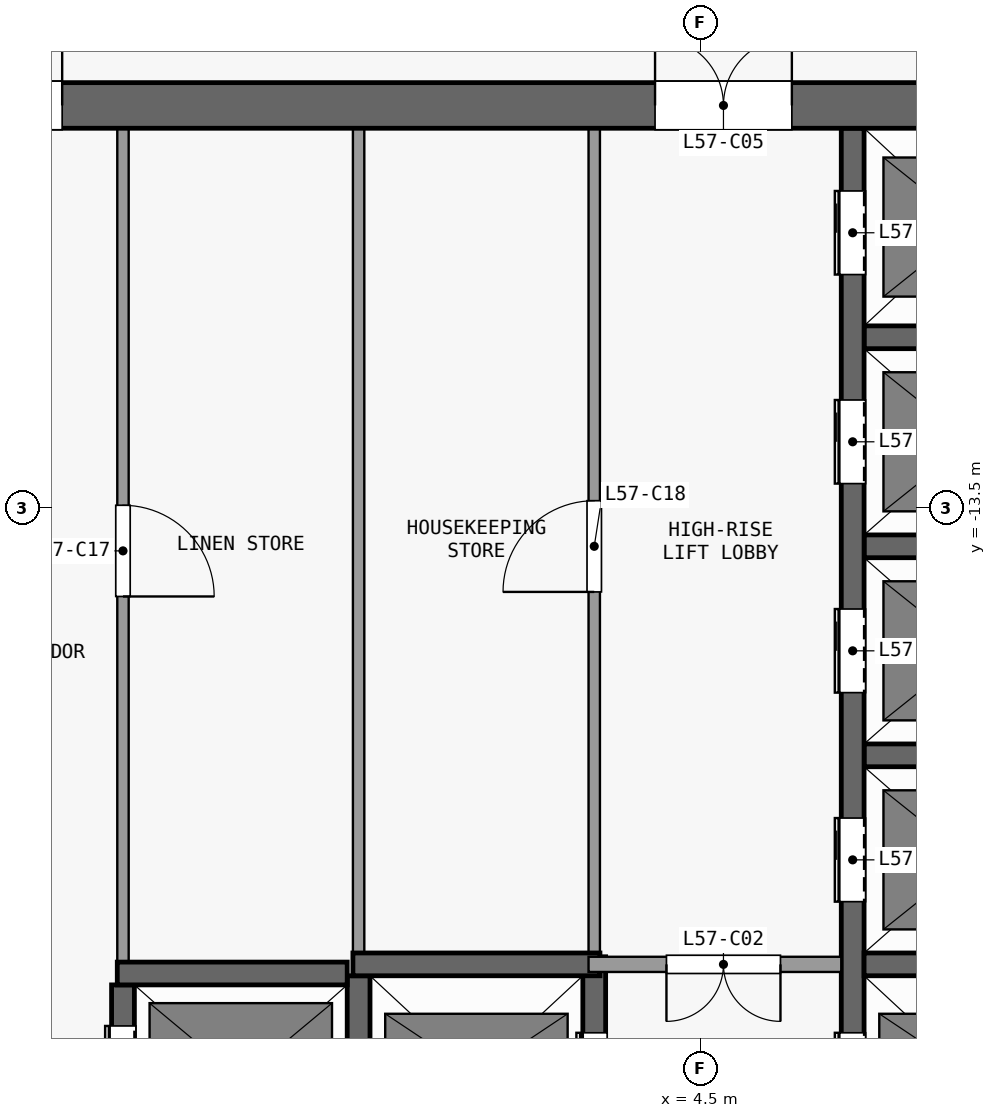
"""IFC4 building model, lengths in metres.
Left out: names, types, materials, properties, quantities, classifications, styles, units other than length and angle.
Written with IfcOpenShell. Run it as: python <this file> out.ifc"""

import sys

from ifc_helpers import new_model, si_unit, direction, frame, frame_2d, origin, place, context, subcontext, project, spatial, rectangle, extrude, element, fill, save


model = new_model("IFC4")
c1 = context("Model", 3, precision=1e-05, world=origin(), true_north=direction((0.0, 1.0)))
c2 = subcontext(c1, "Body", "Model", "MODEL_VIEW")
j1 = project(units=[si_unit("LENGTHUNIT", "METRE"), si_unit("PLANEANGLEUNIT", "RADIAN")], contexts=[c1])
p1 = place(None, origin())
s1 = spatial("IfcSite", under=j1, at=p1, CompositionType="ELEMENT")
p2 = place(p1, origin())
s2 = spatial("IfcBuilding", under=s1, at=p2, CompositionType="ELEMENT")
p3 = place(p2, frame((0.0, 0.0, 226.7)))
s3 = spatial("IfcBuildingStorey", under=s2, at=p3, CompositionType="ELEMENT", Elevation=226.7)
p4 = place(p3, frame((-13.2, -8.2, 0.0), z_axis=(0.0, 0.0, 1.0), x_axis=(1.0, 0.0, 0.0)))
e1 = element("IfcWall", 1, at=p4, inside=s3, PredefinedType="SHEAR", context=c2, shape_type="SweptSolid", body=[
    extrude(rectangle(XDim=26.4, YDim=0.6, at=frame_2d((13.2, 0.0))), origin(), (0.0, 0.0, 1.0), 3.3),
])
p5 = place(p4, frame((7.5, 0.0, 0.0)))
e2 = element("IfcOpeningElement", 2, at=p5, cuts=e1, PredefinedType="OPENING", context=c2, shape_type="SweptSolid", body=[
    extrude(rectangle(XDim=1.8, YDim=2.1, at=frame_2d((0.9, 1.05))), frame((0.0, 0.31, 0.0), z_axis=(0.0, -1.0, 0.0), x_axis=(1.0, 0.0, 0.0)), (0.0, 0.0, 1.0), 0.62),
])
p6 = place(p4, frame((17.1, 0.0, 0.0)))
e3 = element("IfcOpeningElement", 3, at=p6, cuts=e1, PredefinedType="OPENING", context=c2, shape_type="SweptSolid", body=[
    extrude(rectangle(XDim=1.8, YDim=2.1, at=frame_2d((0.9, 1.05))), frame((0.0, 0.31, 0.0), z_axis=(0.0, -1.0, 0.0), x_axis=(1.0, 0.0, 0.0)), (0.0, 0.0, 1.0), 0.62),
])
p7 = place(p4, frame((2.425, 0.0, 0.0)))
e4 = element("IfcOpeningElement", 4, at=p7, cuts=e1, PredefinedType="OPENING", context=c2, shape_type="SweptSolid", body=[
    extrude(rectangle(XDim=0.9, YDim=2.1, at=frame_2d((0.45, 1.05))), frame((0.0, 0.31, 0.0), z_axis=(0.0, -1.0, 0.0), x_axis=(1.0, 0.0, 0.0)), (0.0, 0.0, 1.0), 0.62),
])
p8 = place(p4, frame((23.075, 0.0, 0.0)))
e5 = element("IfcOpeningElement", 5, at=p8, cuts=e1, PredefinedType="OPENING", context=c2, shape_type="SweptSolid", body=[
    extrude(rectangle(XDim=0.9, YDim=2.1, at=frame_2d((0.45, 1.05))), frame((0.0, 0.31, 0.0), z_axis=(0.0, -1.0, 0.0), x_axis=(1.0, 0.0, 0.0)), (0.0, 0.0, 1.0), 0.62),
])
p9 = place(p3, frame((-3.175, -19.62, 0.0), z_axis=(0.0, 0.0, 1.0), x_axis=(1.0, 0.0, 0.0)))
e6 = element("IfcWall", 6, at=p9, inside=s3, PredefinedType="SHEAR", context=c2, shape_type="SweptSolid", body=[
    extrude(rectangle(XDim=3.025, YDim=0.3, at=frame_2d((1.513, 0.0))), origin(), (0.0, 0.0, 1.0), 3.3),
])
p10 = place(p3, frame((-0.075, -19.5, 0.0), z_axis=(0.0, 0.0, 1.0), x_axis=(1.0, 0.0, 0.0)))
e7 = element("IfcWall", 7, at=p10, inside=s3, PredefinedType="SHEAR", context=c2, shape_type="SweptSolid", body=[
    extrude(rectangle(XDim=3.25, YDim=0.3, at=frame_2d((1.625, 0.0))), origin(), (0.0, 0.0, 1.0), 3.3),
])
p11 = place(p3, frame((6.35, -19.5, 0.0), z_axis=(0.0, 0.0, 1.0), x_axis=(-1.0, 0.0, 0.0)))
e8 = element("IfcWall", 8, at=p11, inside=s3, PredefinedType="PARTITIONING", context=c2, shape_type="SweptSolid", body=[
    extrude(rectangle(XDim=3.325, YDim=0.2, at=frame_2d((1.663, 0.0))), origin(), (0.0, 0.0, 1.0), 3.3),
])
p12 = place(p11, frame((0.8, 0.0, 0.0)))
e9 = element("IfcOpeningElement", 9, at=p12, cuts=e8, PredefinedType="OPENING", context=c2, shape_type="SweptSolid", body=[
    extrude(rectangle(XDim=1.5, YDim=2.1, at=frame_2d((0.75, 1.05))), frame((0.0, 0.11, 0.0), z_axis=(0.0, -1.0, 0.0), x_axis=(1.0, 0.0, 0.0)), (0.0, 0.0, 1.0), 0.22),
])
for number, where, z_axis, x_axis in (
    (10, (6.65, -19.5, 0.0), (0.0, 0.0, 1.0), (1.0, 0.0, 0.0)),
    (11, (6.65, -16.75, 0.0), (0.0, 0.0, 1.0), (1.0, 0.0, 0.0)),
    (12, (6.65, -14.0, 0.0), (0.0, 0.0, 1.0), (1.0, 0.0, 0.0)),
    (13, (6.65, -11.25, 0.0), (0.0, 0.0, 1.0), (1.0, 0.0, 0.0)),
):
    element("IfcWall", number, at=place(p3, frame(where, z_axis=z_axis, x_axis=x_axis)), inside=s3, PredefinedType="SHEAR", context=c2, shape_type="SweptSolid", body=[
        extrude(rectangle(XDim=2.8, YDim=0.3, at=frame_2d((1.4, 0.0))), origin(), (0.0, 0.0, 1.0), 3.3),
    ])
p13 = place(p3, frame((-3.1, -22.25, 0.0), z_axis=(0.0, 0.0, 1.0), x_axis=(0.0, 1.0, 0.0)))
e14 = element("IfcWall", 14, at=p13, inside=s3, PredefinedType="SHEAR", context=c2, shape_type="SweptSolid", body=[
    extrude(rectangle(XDim=2.48, YDim=0.3, at=frame_2d((1.24, 0.0))), origin(), (0.0, 0.0, 1.0), 3.3),
])
p14 = place(p13, frame((0.54, 0.0, 0.0)))
e15 = element("IfcOpeningElement", 15, at=p14, cuts=e14, PredefinedType="OPENING", context=c2, shape_type="SweptSolid", body=[
    extrude(rectangle(XDim=1.4, YDim=2.1, at=frame_2d((0.7, 1.05))), frame((0.0, 0.16, 0.0), z_axis=(0.0, -1.0, 0.0), x_axis=(1.0, 0.0, 0.0)), (0.0, 0.0, 1.0), 0.32),
])
p15 = place(p3, frame((-3.1, -8.5, 0.0), z_axis=(0.0, 0.0, 1.0), x_axis=(0.0, -1.0, 0.0)))
e16 = element("IfcWall", 16, at=p15, inside=s3, PredefinedType="PARTITIONING", context=c2, shape_type="SweptSolid", body=[
    extrude(rectangle(XDim=10.97, YDim=0.15, at=frame_2d((5.485, 0.0))), origin(), (0.0, 0.0, 1.0), 3.3),
])
p16 = place(p15, frame((4.96, 0.0, 0.0)))
e17 = element("IfcOpeningElement", 17, at=p16, cuts=e16, PredefinedType="OPENING", context=c2, shape_type="SweptSolid", body=[
    extrude(rectangle(XDim=1.2, YDim=2.1, at=frame_2d((0.6, 1.05))), frame((0.0, 0.085, 0.0), z_axis=(0.0, -1.0, 0.0), x_axis=(1.0, 0.0, 0.0)), (0.0, 0.0, 1.0), 0.17),
])
p17 = place(p3, frame((0.0, -22.25, 0.0), z_axis=(0.0, 0.0, 1.0), x_axis=(0.0, 1.0, 0.0)))
e18 = element("IfcWall", 18, at=p17, inside=s3, PredefinedType="SHEAR", context=c2, shape_type="SweptSolid", body=[
    extrude(rectangle(XDim=2.6, YDim=0.3, at=frame_2d((1.3, 0.0))), origin(), (0.0, 0.0, 1.0), 3.3),
])
p18 = place(p3, frame((0.0, -19.35, 0.0), z_axis=(0.0, 0.0, 1.0), x_axis=(0.0, 1.0, 0.0)))
e19 = element("IfcWall", 19, at=p18, inside=s3, PredefinedType="PARTITIONING", context=c2, shape_type="SweptSolid", body=[
    extrude(rectangle(XDim=10.85, YDim=0.15, at=frame_2d((5.425, 0.0))), origin(), (0.0, 0.0, 1.0), 3.3),
])
p19 = place(p3, frame((3.1, -22.25, 0.0), z_axis=(0.0, 0.0, 1.0), x_axis=(0.0, 1.0, 0.0)))
e20 = element("IfcWall", 20, at=p19, inside=s3, PredefinedType="SHEAR", context=c2, shape_type="SweptSolid", body=[
    extrude(rectangle(XDim=2.85, YDim=0.3, at=frame_2d((1.425, 0.0))), origin(), (0.0, 0.0, 1.0), 3.3),
])
p20 = place(p19, frame((0.75, 0.0, 0.0)))
e21 = element("IfcOpeningElement", 21, at=p20, cuts=e20, PredefinedType="OPENING", context=c2, shape_type="SweptSolid", body=[
    extrude(rectangle(XDim=1.1, YDim=2.1, at=frame_2d((0.55, 1.05))), frame((0.0, 0.16, 0.0), z_axis=(0.0, -1.0, 0.0), x_axis=(1.0, 0.0, 0.0)), (0.0, 0.0, 1.0), 0.32),
])
p21 = place(p3, frame((3.1, -19.4, 0.0), z_axis=(0.0, 0.0, 1.0), x_axis=(0.0, 1.0, 0.0)))
e22 = element("IfcWall", 22, at=p21, inside=s3, PredefinedType="PARTITIONING", context=c2, shape_type="SweptSolid", body=[
    extrude(rectangle(XDim=10.9, YDim=0.15, at=frame_2d((5.45, 0.0))), origin(), (0.0, 0.0, 1.0), 3.3),
])
p22 = place(p21, frame((4.8, 0.0, 0.0)))
e23 = element("IfcOpeningElement", 23, at=p22, cuts=e22, PredefinedType="OPENING", context=c2, shape_type="SweptSolid", body=[
    extrude(rectangle(XDim=1.2, YDim=2.1, at=frame_2d((0.6, 1.05))), frame((0.0, 0.085, 0.0), z_axis=(0.0, -1.0, 0.0), x_axis=(1.0, 0.0, 0.0)), (0.0, 0.0, 1.0), 0.17),
])
p23 = place(p3, frame((6.5, -22.55, 0.0), z_axis=(0.0, 0.0, 1.0), x_axis=(0.0, 1.0, 0.0)))
e24 = element("IfcWall", 24, at=p23, inside=s3, PredefinedType="SHEAR", context=c2, shape_type="SweptSolid", body=[
    extrude(rectangle(XDim=14.05, YDim=0.3, at=frame_2d((7.025, 0.0))), origin(), (0.0, 0.0, 1.0), 3.3),
])
p24 = place(p23, frame((1.05, 0.0, 0.0)))
e25 = element("IfcOpeningElement", 25, at=p24, cuts=e24, PredefinedType="OPENING", context=c2, shape_type="SweptSolid", body=[
    extrude(rectangle(XDim=1.1, YDim=2.1, at=frame_2d((0.55, 1.05))), frame((0.0, 0.16, 0.0), z_axis=(0.0, -1.0, 0.0), x_axis=(1.0, 0.0, 0.0)), (0.0, 0.0, 1.0), 0.32),
])
p25 = place(p23, frame((3.875, 0.0, 0.0)))
e26 = element("IfcOpeningElement", 26, at=p25, cuts=e24, PredefinedType="OPENING", context=c2, shape_type="SweptSolid", body=[
    extrude(rectangle(XDim=1.1, YDim=2.1, at=frame_2d((0.55, 1.05))), frame((0.0, 0.16, 0.0), z_axis=(0.0, -1.0, 0.0), x_axis=(1.0, 0.0, 0.0)), (0.0, 0.0, 1.0), 0.32),
])
p26 = place(p23, frame((6.625, 0.0, 0.0)))
e27 = element("IfcOpeningElement", 27, at=p26, cuts=e24, PredefinedType="OPENING", context=c2, shape_type="SweptSolid", body=[
    extrude(rectangle(XDim=1.1, YDim=2.1, at=frame_2d((0.55, 1.05))), frame((0.0, 0.16, 0.0), z_axis=(0.0, -1.0, 0.0), x_axis=(1.0, 0.0, 0.0)), (0.0, 0.0, 1.0), 0.32),
])
p27 = place(p23, frame((9.375, 0.0, 0.0)))
e28 = element("IfcOpeningElement", 28, at=p27, cuts=e24, PredefinedType="OPENING", context=c2, shape_type="SweptSolid", body=[
    extrude(rectangle(XDim=1.1, YDim=2.1, at=frame_2d((0.55, 1.05))), frame((0.0, 0.16, 0.0), z_axis=(0.0, -1.0, 0.0), x_axis=(1.0, 0.0, 0.0)), (0.0, 0.0, 1.0), 0.32),
])
p28 = place(p23, frame((12.125, 0.0, 0.0)))
e29 = element("IfcOpeningElement", 29, at=p28, cuts=e24, PredefinedType="OPENING", context=c2, shape_type="SweptSolid", body=[
    extrude(rectangle(XDim=1.1, YDim=2.1, at=frame_2d((0.55, 1.05))), frame((0.0, 0.16, 0.0), z_axis=(0.0, -1.0, 0.0), x_axis=(1.0, 0.0, 0.0)), (0.0, 0.0, 1.0), 0.32),
])
p29 = place(p20, origin())
e30 = element("IfcDoor", 30, at=p29, inside=s3, OperationType="DOUBLE_DOOR_SLIDING", PredefinedType="DOOR", context=c2, shape_type="SweptSolid", body=[
    extrude(rectangle(XDim=1.1, YDim=2.1, at=frame_2d((0.55, 1.05))), frame((0.0, 0.025, 0.0), z_axis=(0.0, -1.0, 0.0), x_axis=(1.0, 0.0, 0.0)), (0.0, 0.0, 1.0), 0.05),
])
fill(e21, e30)
p30 = place(p24, origin())
e31 = element("IfcDoor", 31, at=p30, inside=s3, OperationType="DOUBLE_DOOR_SLIDING", PredefinedType="DOOR", context=c2, shape_type="SweptSolid", body=[
    extrude(rectangle(XDim=1.1, YDim=2.1, at=frame_2d((0.55, 1.05))), frame((0.0, 0.025, 0.0), z_axis=(0.0, -1.0, 0.0), x_axis=(1.0, 0.0, 0.0)), (0.0, 0.0, 1.0), 0.05),
])
fill(e25, e31)
p31 = place(p25, origin())
e32 = element("IfcDoor", 32, at=p31, inside=s3, OperationType="DOUBLE_DOOR_SLIDING", PredefinedType="DOOR", context=c2, shape_type="SweptSolid", body=[
    extrude(rectangle(XDim=1.1, YDim=2.1, at=frame_2d((0.55, 1.05))), frame((0.0, 0.025, 0.0), z_axis=(0.0, -1.0, 0.0), x_axis=(1.0, 0.0, 0.0)), (0.0, 0.0, 1.0), 0.05),
])
fill(e26, e32)
p32 = place(p26, origin())
e33 = element("IfcDoor", 33, at=p32, inside=s3, OperationType="DOUBLE_DOOR_SLIDING", PredefinedType="DOOR", context=c2, shape_type="SweptSolid", body=[
    extrude(rectangle(XDim=1.1, YDim=2.1, at=frame_2d((0.55, 1.05))), frame((0.0, 0.025, 0.0), z_axis=(0.0, -1.0, 0.0), x_axis=(1.0, 0.0, 0.0)), (0.0, 0.0, 1.0), 0.05),
])
fill(e27, e33)
p33 = place(p27, origin())
e34 = element("IfcDoor", 34, at=p33, inside=s3, OperationType="DOUBLE_DOOR_SLIDING", PredefinedType="DOOR", context=c2, shape_type="SweptSolid", body=[
    extrude(rectangle(XDim=1.1, YDim=2.1, at=frame_2d((0.55, 1.05))), frame((0.0, 0.025, 0.0), z_axis=(0.0, -1.0, 0.0), x_axis=(1.0, 0.0, 0.0)), (0.0, 0.0, 1.0), 0.05),
])
fill(e28, e34)
p34 = place(p28, origin())
e35 = element("IfcDoor", 35, at=p34, inside=s3, OperationType="DOUBLE_DOOR_SLIDING", PredefinedType="DOOR", context=c2, shape_type="SweptSolid", body=[
    extrude(rectangle(XDim=1.1, YDim=2.1, at=frame_2d((0.55, 1.05))), frame((0.0, 0.025, 0.0), z_axis=(0.0, -1.0, 0.0), x_axis=(1.0, 0.0, 0.0)), (0.0, 0.0, 1.0), 0.05),
])
fill(e29, e35)
p35 = place(p14, origin())
e36 = element("IfcDoor", 36, at=p35, inside=s3, OperationType="DOUBLE_DOOR_SLIDING", PredefinedType="DOOR", context=c2, shape_type="SweptSolid", body=[
    extrude(rectangle(XDim=1.4, YDim=2.1, at=frame_2d((0.7, 1.05))), frame((0.0, 0.025, 0.0), z_axis=(0.0, -1.0, 0.0), x_axis=(1.0, 0.0, 0.0)), (0.0, 0.0, 1.0), 0.05),
])
fill(e15, e36)
p36 = place(p12, origin())
e37 = element("IfcDoor", 37, at=p36, inside=s3, OperationType="DOUBLE_DOOR_SINGLE_SWING", PredefinedType="DOOR", context=c2, shape_type="SweptSolid", body=[
    extrude(rectangle(XDim=1.5, YDim=2.1, at=frame_2d((0.75, 1.05))), frame((0.0, 0.025, 0.0), z_axis=(0.0, -1.0, 0.0), x_axis=(1.0, 0.0, 0.0)), (0.0, 0.0, 1.0), 0.05),
])
fill(e9, e37)
p37 = place(p5, origin())
e38 = element("IfcDoor", 38, at=p37, inside=s3, OperationType="DOUBLE_DOOR_SINGLE_SWING", PredefinedType="DOOR", context=c2, shape_type="SweptSolid", body=[
    extrude(rectangle(XDim=1.8, YDim=2.1, at=frame_2d((0.9, 1.05))), frame((0.0, 0.025, 0.0), z_axis=(0.0, -1.0, 0.0), x_axis=(1.0, 0.0, 0.0)), (0.0, 0.0, 1.0), 0.05),
])
fill(e2, e38)
p38 = place(p6, origin())
e39 = element("IfcDoor", 39, at=p38, inside=s3, OperationType="DOUBLE_DOOR_SINGLE_SWING", PredefinedType="DOOR", context=c2, shape_type="SweptSolid", body=[
    extrude(rectangle(XDim=1.8, YDim=2.1, at=frame_2d((0.9, 1.05))), frame((0.0, 0.025, 0.0), z_axis=(0.0, -1.0, 0.0), x_axis=(1.0, 0.0, 0.0)), (0.0, 0.0, 1.0), 0.05),
])
fill(e3, e39)
p39 = place(p16, origin())
e40 = element("IfcDoor", 40, at=p39, inside=s3, OperationType="SINGLE_SWING_RIGHT", PredefinedType="DOOR", context=c2, shape_type="SweptSolid", body=[
    extrude(rectangle(XDim=1.2, YDim=2.1, at=frame_2d((0.6, 1.05))), frame((0.0, 0.025, 0.0), z_axis=(0.0, -1.0, 0.0), x_axis=(1.0, 0.0, 0.0)), (0.0, 0.0, 1.0), 0.05),
])
fill(e17, e40)
p40 = place(p22, origin())
e41 = element("IfcDoor", 41, at=p40, inside=s3, OperationType="SINGLE_SWING_LEFT", PredefinedType="DOOR", context=c2, shape_type="SweptSolid", body=[
    extrude(rectangle(XDim=1.2, YDim=2.1, at=frame_2d((0.6, 1.05))), frame((0.0, 0.025, 0.0), z_axis=(0.0, -1.0, 0.0), x_axis=(1.0, 0.0, 0.0)), (0.0, 0.0, 1.0), 0.05),
])
fill(e23, e41)
save(model, sys.argv[1])
